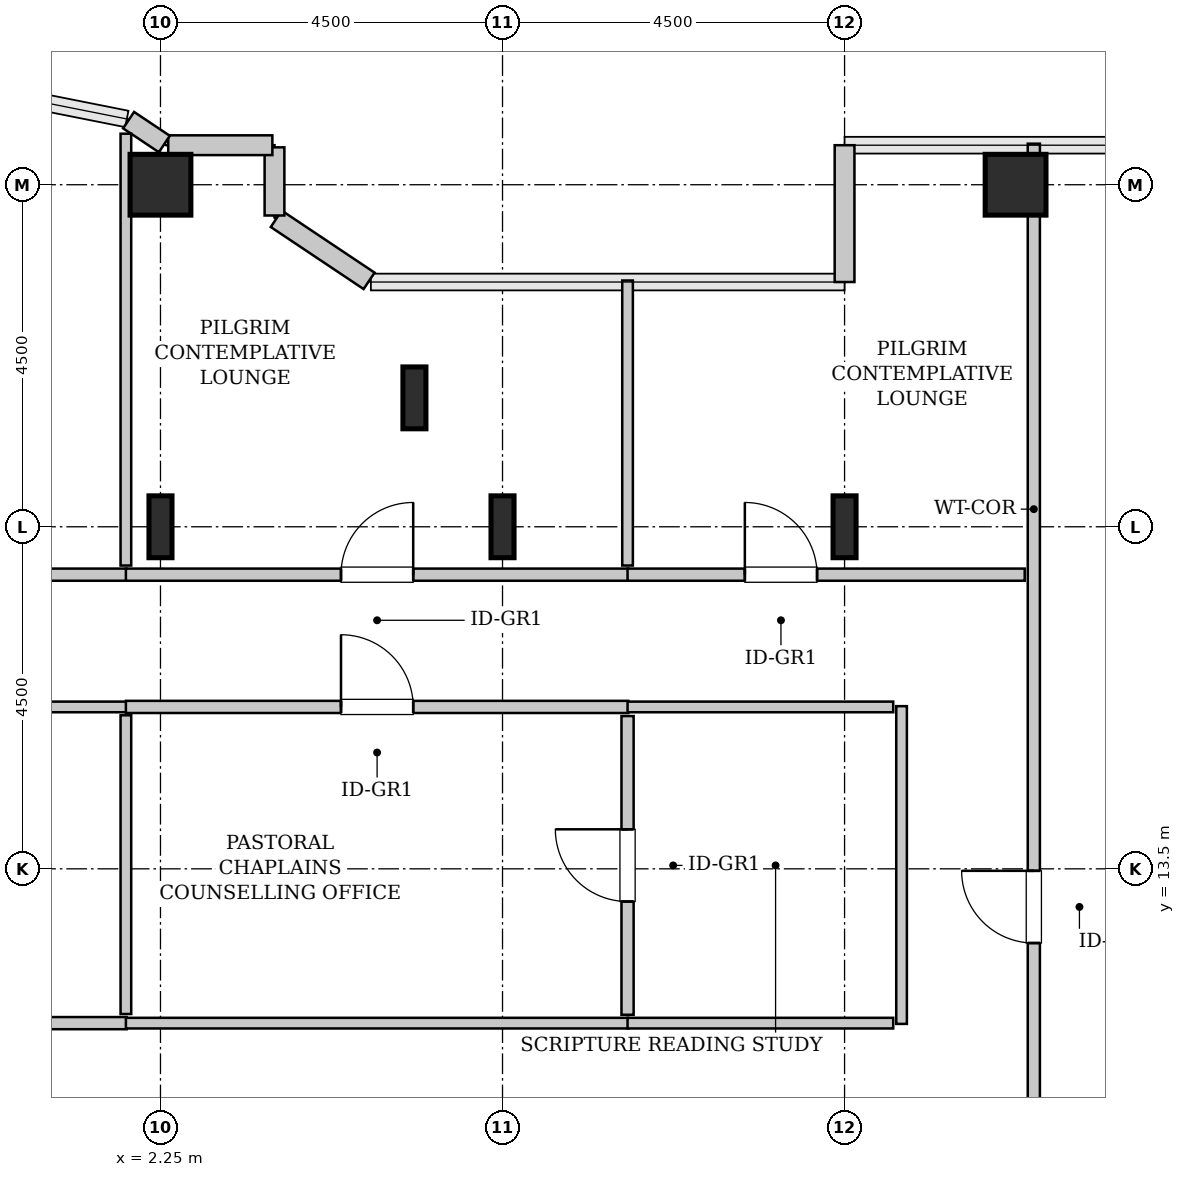
"""IFC4 building model, lengths in metres.
Left out: names, types, materials, properties, quantities, classifications, styles, units other than length and angle.
Written with IfcOpenShell. Run it as: python <this file> out.ifc"""

import sys

from ifc_helpers import new_model, si_unit, direction, frame, frame_2d, origin, origin_2d, place, context, subcontext, project, spatial, rectangle, hollow_rectangle, i_section, extrude, source, transform, mapped, element, fill, save


model = new_model("IFC4")
c1 = context("Model", 3, precision=1e-05, world=origin(), true_north=direction((0.0, 1.0)))
c2 = subcontext(c1, "Body", "Model", "MODEL_VIEW")
j1 = project(units=[si_unit("LENGTHUNIT", "METRE"), si_unit("PLANEANGLEUNIT", "RADIAN")], contexts=[c1])
p1 = place(None, origin())
s1 = spatial("IfcSite", under=j1, at=p1, CompositionType="ELEMENT")
p2 = place(p1, origin())
s2 = spatial("IfcBuilding", under=s1, at=p2, CompositionType="ELEMENT")
p3 = place(p2, frame((0.0, 0.0, 183.0)))
s3 = spatial("IfcBuildingStorey", under=s2, at=p3, CompositionType="ELEMENT", Elevation=183.0)
m1 = source(origin(), c2, "Body", "SweptSolid", [
    extrude(i_section(OverallWidth=0.303, OverallDepth=0.814, WebThickness=0.021, FlangeThickness=0.04, FilletRadius=0.03, at=origin_2d()), origin(), (0.0, 0.0, 1.0), 3.8),
])
p4 = place(p3, frame((2.25, 18.0, 0.0), z_axis=(0.0, 0.0, 1.0), x_axis=(1.0, 0.0, 0.0)))
e1 = element("IfcColumn", 1, at=p4, inside=s3, PredefinedType="COLUMN", context=c2, shape_type="MappedRepresentation", body=[
    mapped(m1, transform((0.0, 0.0, 0.0), x_axis=(1.0, 0.0, 0.0), y_axis=(0.0, 1.0, 0.0), z_axis=(0.0, 0.0, 1.0), scale=1.0)),
])
m2 = source(origin(), c2, "Body", "SweptSolid", [
    extrude(hollow_rectangle(XDim=0.8, YDim=0.8, WallThickness=0.04, InnerFilletRadius=0.04, OuterFilletRadius=0.08, at=origin_2d()), origin(), (0.0, 0.0, 1.0), 3.8),
])
p5 = place(p3, frame((2.25, 22.5, 0.0), z_axis=(0.0, 0.0, 1.0), x_axis=(1.0, 0.0, 0.0)))
e2 = element("IfcColumn", 2, at=p5, inside=s3, PredefinedType="COLUMN", context=c2, shape_type="MappedRepresentation", body=[
    mapped(m2, transform((0.0, 0.0, 0.0), x_axis=(1.0, 0.0, 0.0), y_axis=(0.0, 1.0, 0.0), z_axis=(0.0, 0.0, 1.0), scale=1.0)),
])
for number, where, z_axis, x_axis in (
    (3, (5.591, 19.696, 0.0), (0.0, 0.0, 1.0), (1.0, 0.0, 0.0)),
    (4, (6.75, 18.0, 0.0), (0.0, 0.0, 1.0), (1.0, 0.0, 0.0)),
    (5, (11.25, 18.0, 0.0), (0.0, 0.0, 1.0), (1.0, 0.0, 0.0)),
):
    element("IfcColumn", number, at=place(p3, frame(where, z_axis=z_axis, x_axis=x_axis)), inside=s3, PredefinedType="COLUMN", context=c2, shape_type="MappedRepresentation", body=[
        mapped(m1, transform((0.0, 0.0, 0.0), x_axis=(1.0, 0.0, 0.0), y_axis=(0.0, 1.0, 0.0), z_axis=(0.0, 0.0, 1.0), scale=1.0)),
    ])
p6 = place(p3, frame((13.5, 22.5, 0.0), z_axis=(0.0, 0.0, 1.0), x_axis=(1.0, 0.0, 0.0)))
e6 = element("IfcColumn", 6, at=p6, inside=s3, PredefinedType="COLUMN", context=c2, shape_type="MappedRepresentation", body=[
    mapped(m2, transform((0.0, 0.0, 0.0), x_axis=(1.0, 0.0, 0.0), y_axis=(0.0, 1.0, 0.0), z_axis=(0.0, 0.0, 1.0), scale=1.0)),
])
m3 = source(origin(), c2, "Body", "SweptSolid", [
    extrude(rectangle(XDim=1.8, YDim=0.26, at=frame_2d((0.9, 0.0))), origin(), (0.0, 0.0, 1.0), 3.55),
])
p7 = place(p3, frame((11.25, 23.02, 0.0), z_axis=(0.0, 0.0, 1.0), x_axis=(0.0, -1.0, 0.0)))
e7 = element("IfcWall", 7, at=p7, inside=s3, PredefinedType="SOLIDWALL", context=c2, shape_type="MappedRepresentation", body=[
    mapped(m3, transform((0.0, 0.0, 0.0), x_axis=(1.0, 0.0, 0.0), y_axis=(0.0, 1.0, 0.0), z_axis=(0.0, 0.0, 1.0), scale=1.0)),
])
m4 = source(origin(), c2, "Body", "SweptSolid", [
    extrude(rectangle(XDim=1.469, YDim=0.26, at=frame_2d((0.734, 0.0))), origin(), (0.0, 0.0, 1.0), 3.55),
])
p8 = place(p3, frame((4.995, 21.236, 0.0), z_axis=(0.0, 0.0, 1.0), x_axis=(-0.831461760506, 0.555581983884, 0.0)))
e8 = element("IfcWall", 8, at=p8, inside=s3, PredefinedType="SOLIDWALL", context=c2, shape_type="MappedRepresentation", body=[
    mapped(m4, transform((0.0, 0.0, 0.0), x_axis=(1.0, 0.0, 0.0), y_axis=(0.0, 1.0, 0.0), z_axis=(0.0, 0.0, 1.0), scale=1.0)),
])
m5 = source(origin(), c2, "Body", "SweptSolid", [
    extrude(rectangle(XDim=0.897, YDim=0.26, at=frame_2d((0.448, 0.0))), origin(), (0.0, 0.0, 1.0), 3.55),
])
p9 = place(p3, frame((3.75, 22.095, 0.0), z_axis=(0.0, 0.0, 1.0), x_axis=(0.0, 1.0, 0.0)))
e9 = element("IfcWall", 9, at=p9, inside=s3, PredefinedType="SOLIDWALL", context=c2, shape_type="MappedRepresentation", body=[
    mapped(m5, transform((0.0, 0.0, 0.0), x_axis=(1.0, 0.0, 0.0), y_axis=(0.0, 1.0, 0.0), z_axis=(0.0, 0.0, 1.0), scale=1.0)),
])
m6 = source(origin(), c2, "Body", "SweptSolid", [
    extrude(rectangle(XDim=1.37, YDim=0.26, at=frame_2d((0.685, 0.0))), origin(), (0.0, 0.0, 1.0), 3.55),
])
p10 = place(p3, frame((3.722, 23.02, 0.0), z_axis=(0.0, 0.0, 1.0), x_axis=(-1.0, 0.0, 0.0)))
e10 = element("IfcWall", 10, at=p10, inside=s3, PredefinedType="SOLIDWALL", context=c2, shape_type="MappedRepresentation", body=[
    mapped(m6, transform((0.0, 0.0, 0.0), x_axis=(1.0, 0.0, 0.0), y_axis=(0.0, 1.0, 0.0), z_axis=(0.0, 0.0, 1.0), scale=1.0)),
])
m7 = source(origin(), c2, "Body", "SweptSolid", [
    extrude(rectangle(XDim=0.565, YDim=0.26, at=frame_2d((0.283, 0.0))), origin(), (0.0, 0.0, 1.0), 3.55),
])
p11 = place(p3, frame((2.301, 23.036, 0.0), z_axis=(0.0, 0.0, 1.0), x_axis=(-0.831651492666, 0.555297933317, 0.0)))
e11 = element("IfcWall", 11, at=p11, inside=s3, PredefinedType="SOLIDWALL", context=c2, shape_type="MappedRepresentation", body=[
    mapped(m7, transform((0.0, 0.0, 0.0), x_axis=(1.0, 0.0, 0.0), y_axis=(0.0, 1.0, 0.0), z_axis=(0.0, 0.0, 1.0), scale=1.0)),
])
m8 = source(origin(), c2, "Body", "SweptSolid", [
    extrude(rectangle(XDim=14.453, YDim=0.16, at=frame_2d((7.226, 0.0))), origin(), (0.0, 0.0, 1.0), 3.535),
])
p12 = place(p3, frame((13.74, 8.587, 0.0), z_axis=(0.0, 0.0, 1.0), x_axis=(0.0, 1.0, 0.0)))
e12 = element("IfcWall", 12, at=p12, inside=s3, PredefinedType="PARTITIONING", context=c2, shape_type="MappedRepresentation", body=[
    mapped(m8, transform((0.0, 0.0, 0.0), x_axis=(1.0, 0.0, 0.0), y_axis=(0.0, 1.0, 0.0), z_axis=(0.0, 0.0, 1.0), scale=1.0)),
])
p13 = place(p12, frame((3.936, 0.0, 0.0)))
e13 = element("IfcOpeningElement", 13, at=p13, cuts=e12, PredefinedType="OPENING", context=c2, shape_type="SweptSolid", body=[
    extrude(rectangle(XDim=0.95, YDim=2.1, at=frame_2d((0.475, 1.05))), frame((0.0, 0.09, 0.0), z_axis=(0.0, -1.0, 0.0), x_axis=(1.0, 0.0, 0.0)), (0.0, 0.0, 1.0), 0.18),
])
m9 = source(origin(), c2, "Body", "SweptSolid", [
    extrude(rectangle(XDim=13.815, YDim=0.16, at=frame_2d((6.907, 0.0))), origin(), (0.0, 0.0, 1.0), 3.535),
])
p14 = place(p3, frame((-12.01, 11.47, 0.0), z_axis=(0.0, 0.0, 1.0), x_axis=(1.0, 0.0, 0.0)))
e14 = element("IfcWall", 14, at=p14, inside=s3, PredefinedType="PARTITIONING", context=c2, shape_type="MappedRepresentation", body=[
    mapped(m9, transform((0.0, 0.0, 0.0), x_axis=(1.0, 0.0, 0.0), y_axis=(0.0, 1.0, 0.0), z_axis=(0.0, 0.0, 1.0), scale=1.0)),
])
p15 = place(p14, frame((6.433, 0.0, 0.0)))
e15 = element("IfcOpeningElement", 15, at=p15, cuts=e14, PredefinedType="OPENING", context=c2, shape_type="SweptSolid", body=[
    extrude(rectangle(XDim=0.95, YDim=2.1, at=frame_2d((0.475, 1.05))), frame((0.0, 0.09, 0.0), z_axis=(0.0, -1.0, 0.0), x_axis=(1.0, 0.0, 0.0)), (0.0, 0.0, 1.0), 0.18),
])
m10 = source(origin(), c2, "Body", "SweptSolid", [
    extrude(rectangle(XDim=13.815, YDim=0.14, at=frame_2d((6.907, 0.0))), origin(), (0.0, 0.0, 1.0), 3.535),
])
p16 = place(p3, frame((-12.01, 15.63, 0.0), z_axis=(0.0, 0.0, 1.0), x_axis=(1.0, 0.0, 0.0)))
e16 = element("IfcWall", 16, at=p16, inside=s3, PredefinedType="PARTITIONING", context=c2, shape_type="MappedRepresentation", body=[
    mapped(m10, transform((0.0, 0.0, 0.0), x_axis=(1.0, 0.0, 0.0), y_axis=(0.0, 1.0, 0.0), z_axis=(0.0, 0.0, 1.0), scale=1.0)),
])
m11 = source(origin(), c2, "Body", "SweptSolid", [
    extrude(rectangle(XDim=3.93, YDim=0.14, at=frame_2d((1.965, 0.0))), origin(), (0.0, 0.0, 1.0), 3.535),
])
p17 = place(p3, frame((1.795, 11.59, 0.0), z_axis=(0.0, 0.0, 1.0), x_axis=(0.0, 1.0, 0.0)))
e17 = element("IfcWall", 17, at=p17, inside=s3, PredefinedType="PARTITIONING", context=c2, shape_type="MappedRepresentation", body=[
    mapped(m11, transform((0.0, 0.0, 0.0), x_axis=(1.0, 0.0, 0.0), y_axis=(0.0, 1.0, 0.0), z_axis=(0.0, 0.0, 1.0), scale=1.0)),
])
m12 = source(origin(), c2, "Body", "SweptSolid", [
    extrude(rectangle(XDim=9.245, YDim=0.16, at=frame_2d((4.623, 0.0))), origin(), (0.0, 0.0, 1.0), 3.535),
])
p18 = place(p3, frame((-7.44, 17.37, 0.0), z_axis=(0.0, 0.0, 1.0), x_axis=(1.0, 0.0, 0.0)))
e18 = element("IfcWall", 18, at=p18, inside=s3, PredefinedType="PARTITIONING", context=c2, shape_type="MappedRepresentation", body=[
    mapped(m12, transform((0.0, 0.0, 0.0), x_axis=(1.0, 0.0, 0.0), y_axis=(0.0, 1.0, 0.0), z_axis=(0.0, 0.0, 1.0), scale=1.0)),
])
p19 = place(p18, frame((3.529, 0.0, 0.0)))
e19 = element("IfcOpeningElement", 19, at=p19, cuts=e18, PredefinedType="OPENING", context=c2, shape_type="SweptSolid", body=[
    extrude(rectangle(XDim=0.95, YDim=2.1, at=frame_2d((0.475, 1.05))), frame((0.0, 0.09, 0.0), z_axis=(0.0, -1.0, 0.0), x_axis=(1.0, 0.0, 0.0)), (0.0, 0.0, 1.0), 0.18),
])
m13 = source(origin(), c2, "Body", "SweptSolid", [
    extrude(rectangle(XDim=5.681, YDim=0.14, at=frame_2d((2.841, 0.0))), origin(), (0.0, 0.0, 1.0), 2.875),
])
p20 = place(p3, frame((1.795, 17.49, 0.0), z_axis=(0.0, 0.0, 1.0), x_axis=(0.0, 1.0, 0.0)))
e20 = element("IfcWall", 20, at=p20, inside=s3, PredefinedType="PARTITIONING", context=c2, shape_type="MappedRepresentation", body=[
    mapped(m13, transform((0.0, 0.0, 0.0), x_axis=(1.0, 0.0, 0.0), y_axis=(0.0, 1.0, 0.0), z_axis=(0.0, 0.0, 1.0), scale=1.0)),
])
m14 = source(origin(), c2, "Body", "SweptSolid", [
    extrude(rectangle(XDim=6.61, YDim=0.16, at=frame_2d((3.305, 0.0))), origin(), (0.0, 0.0, 1.0), 3.535),
])
p21 = place(p3, frame((1.795, 17.37, 0.0), z_axis=(0.0, 0.0, 1.0), x_axis=(1.0, 0.0, 0.0)))
e21 = element("IfcWall", 21, at=p21, inside=s3, PredefinedType="PARTITIONING", context=c2, shape_type="MappedRepresentation", body=[
    mapped(m14, transform((0.0, 0.0, 0.0), x_axis=(1.0, 0.0, 0.0), y_axis=(0.0, 1.0, 0.0), z_axis=(0.0, 0.0, 1.0), scale=1.0)),
])
p22 = place(p21, frame((2.83, 0.0, 0.0)))
e22 = element("IfcOpeningElement", 22, at=p22, cuts=e21, PredefinedType="OPENING", context=c2, shape_type="SweptSolid", body=[
    extrude(rectangle(XDim=0.95, YDim=2.1, at=frame_2d((0.475, 1.05))), frame((0.0, 0.09, 0.0), z_axis=(0.0, -1.0, 0.0), x_axis=(1.0, 0.0, 0.0)), (0.0, 0.0, 1.0), 0.18),
])
m15 = source(origin(), c2, "Body", "SweptSolid", [
    extrude(rectangle(XDim=3.75, YDim=0.14, at=frame_2d((1.875, 0.0))), origin(), (0.0, 0.0, 1.0), 3.535),
])
p23 = place(p3, frame((8.395, 17.49, 0.0), z_axis=(0.0, 0.0, 1.0), x_axis=(0.0, 1.0, 0.0)))
e23 = element("IfcWall", 23, at=p23, inside=s3, PredefinedType="PARTITIONING", context=c2, shape_type="MappedRepresentation", body=[
    mapped(m15, transform((0.0, 0.0, 0.0), x_axis=(1.0, 0.0, 0.0), y_axis=(0.0, 1.0, 0.0), z_axis=(0.0, 0.0, 1.0), scale=1.0)),
])
p24 = place(p3, frame((1.795, 15.63, 0.0), z_axis=(0.0, 0.0, 1.0), x_axis=(1.0, 0.0, 0.0)))
e24 = element("IfcWall", 24, at=p24, inside=s3, PredefinedType="PARTITIONING", context=c2, shape_type="MappedRepresentation", body=[
    mapped(m14, transform((0.0, 0.0, 0.0), x_axis=(1.0, 0.0, 0.0), y_axis=(0.0, 1.0, 0.0), z_axis=(0.0, 0.0, 1.0), scale=1.0)),
])
p25 = place(p24, frame((2.83, 0.0, 0.0)))
e25 = element("IfcOpeningElement", 25, at=p25, cuts=e24, PredefinedType="OPENING", context=c2, shape_type="SweptSolid", body=[
    extrude(rectangle(XDim=0.95, YDim=2.1, at=frame_2d((0.475, 1.05))), frame((0.0, 0.09, 0.0), z_axis=(0.0, -1.0, 0.0), x_axis=(1.0, 0.0, 0.0)), (0.0, 0.0, 1.0), 0.18),
])
m16 = source(origin(), c2, "Body", "SweptSolid", [
    extrude(rectangle(XDim=6.61, YDim=0.14, at=frame_2d((3.305, 0.0))), origin(), (0.0, 0.0, 1.0), 3.535),
])
p26 = place(p3, frame((1.795, 11.47, 0.0), z_axis=(0.0, 0.0, 1.0), x_axis=(1.0, 0.0, 0.0)))
e26 = element("IfcWall", 26, at=p26, inside=s3, PredefinedType="PARTITIONING", context=c2, shape_type="MappedRepresentation", body=[
    mapped(m16, transform((0.0, 0.0, 0.0), x_axis=(1.0, 0.0, 0.0), y_axis=(0.0, 1.0, 0.0), z_axis=(0.0, 0.0, 1.0), scale=1.0)),
])
m17 = source(origin(), c2, "Body", "SweptSolid", [
    extrude(rectangle(XDim=3.93, YDim=0.16, at=frame_2d((1.965, 0.0))), origin(), (0.0, 0.0, 1.0), 3.535),
])
p27 = place(p3, frame((8.395, 11.58, 0.0), z_axis=(0.0, 0.0, 1.0), x_axis=(0.0, 1.0, 0.0)))
e27 = element("IfcWall", 27, at=p27, inside=s3, PredefinedType="PARTITIONING", context=c2, shape_type="MappedRepresentation", body=[
    mapped(m17, transform((0.0, 0.0, 0.0), x_axis=(1.0, 0.0, 0.0), y_axis=(0.0, 1.0, 0.0), z_axis=(0.0, 0.0, 1.0), scale=1.0)),
])
p28 = place(p27, frame((1.49, 0.0, 0.0)))
e28 = element("IfcOpeningElement", 28, at=p28, cuts=e27, PredefinedType="OPENING", context=c2, shape_type="SweptSolid", body=[
    extrude(rectangle(XDim=0.95, YDim=2.1, at=frame_2d((0.475, 1.05))), frame((0.0, 0.09, 0.0), z_axis=(0.0, -1.0, 0.0), x_axis=(1.0, 0.0, 0.0)), (0.0, 0.0, 1.0), 0.18),
])
m18 = source(origin(), c2, "Body", "SweptSolid", [
    extrude(rectangle(XDim=5.225, YDim=0.16, at=frame_2d((2.613, 0.0))), origin(), (0.0, 0.0, 1.0), 3.535),
])
p29 = place(p3, frame((8.395, 17.37, 0.0), z_axis=(0.0, 0.0, 1.0), x_axis=(1.0, 0.0, 0.0)))
e29 = element("IfcWall", 29, at=p29, inside=s3, PredefinedType="PARTITIONING", context=c2, shape_type="MappedRepresentation", body=[
    mapped(m18, transform((0.0, 0.0, 0.0), x_axis=(1.0, 0.0, 0.0), y_axis=(0.0, 1.0, 0.0), z_axis=(0.0, 0.0, 1.0), scale=1.0)),
])
p30 = place(p29, frame((1.543, 0.0, 0.0)))
e30 = element("IfcOpeningElement", 30, at=p30, cuts=e29, PredefinedType="OPENING", context=c2, shape_type="SweptSolid", body=[
    extrude(rectangle(XDim=0.95, YDim=2.1, at=frame_2d((0.475, 1.05))), frame((0.0, 0.09, 0.0), z_axis=(0.0, -1.0, 0.0), x_axis=(1.0, 0.0, 0.0)), (0.0, 0.0, 1.0), 0.18),
])
m19 = source(origin(), c2, "Body", "SweptSolid", [
    extrude(rectangle(XDim=4.18, YDim=0.14, at=frame_2d((2.09, 0.0))), origin(), (0.0, 0.0, 1.0), 3.535),
])
p31 = place(p3, frame((12.0, 11.46, 0.0), z_axis=(0.0, 0.0, 1.0), x_axis=(0.0, 1.0, 0.0)))
e31 = element("IfcWall", 31, at=p31, inside=s3, PredefinedType="PARTITIONING", context=c2, shape_type="MappedRepresentation", body=[
    mapped(m19, transform((0.0, 0.0, 0.0), x_axis=(1.0, 0.0, 0.0), y_axis=(0.0, 1.0, 0.0), z_axis=(0.0, 0.0, 1.0), scale=1.0)),
])
m20 = source(origin(), c2, "Body", "SweptSolid", [
    extrude(rectangle(XDim=3.495, YDim=0.14, at=frame_2d((1.748, 0.0))), origin(), (0.0, 0.0, 1.0), 3.535),
])
for number, where, z_axis, x_axis in (
    (32, (8.395, 15.63, 0.0), (0.0, 0.0, 1.0), (1.0, 0.0, 0.0)),
    (33, (8.395, 11.47, 0.0), (0.0, 0.0, 1.0), (1.0, 0.0, 0.0)),
):
    element("IfcWall", number, at=place(p3, frame(where, z_axis=z_axis, x_axis=x_axis)), inside=s3, PredefinedType="PARTITIONING", context=c2, shape_type="MappedRepresentation", body=[
        mapped(m20, transform((0.0, 0.0, 0.0), x_axis=(1.0, 0.0, 0.0), y_axis=(0.0, 1.0, 0.0), z_axis=(0.0, 0.0, 1.0), scale=1.0)),
    ])
m21 = source(origin(), c2, "Body", "SweptSolid", [
    extrude(rectangle(XDim=0.95, YDim=2.1, at=frame_2d((0.475, 1.05))), frame((0.0, 0.025, 0.0), z_axis=(0.0, -1.0, 0.0), x_axis=(1.0, 0.0, 0.0)), (0.0, 0.0, 1.0), 0.05),
])
p32 = place(p13, origin())
e34 = element("IfcDoor", 34, at=p32, inside=s3, OperationType="SINGLE_SWING_RIGHT", PredefinedType="DOOR", context=c2, shape_type="MappedRepresentation", body=[
    mapped(m21, transform((0.0, 0.0, 0.0), x_axis=(1.0, 0.0, 0.0), y_axis=(0.0, 1.0, 0.0), z_axis=(0.0, 0.0, 1.0), scale=1.0)),
])
fill(e13, e34)
p33 = place(p22, origin())
e35 = element("IfcDoor", 35, at=p33, inside=s3, OperationType="SINGLE_SWING_RIGHT", PredefinedType="DOOR", context=c2, shape_type="MappedRepresentation", body=[
    mapped(m21, transform((0.0, 0.0, 0.0), x_axis=(1.0, 0.0, 0.0), y_axis=(0.0, 1.0, 0.0), z_axis=(0.0, 0.0, 1.0), scale=1.0)),
])
fill(e22, e35)
p34 = place(p25, origin())
e36 = element("IfcDoor", 36, at=p34, inside=s3, OperationType="SINGLE_SWING_LEFT", PredefinedType="DOOR", context=c2, shape_type="MappedRepresentation", body=[
    mapped(m21, transform((0.0, 0.0, 0.0), x_axis=(1.0, 0.0, 0.0), y_axis=(0.0, 1.0, 0.0), z_axis=(0.0, 0.0, 1.0), scale=1.0)),
])
fill(e25, e36)
p35 = place(p28, origin())
e37 = element("IfcDoor", 37, at=p35, inside=s3, OperationType="SINGLE_SWING_RIGHT", PredefinedType="DOOR", context=c2, shape_type="MappedRepresentation", body=[
    mapped(m21, transform((0.0, 0.0, 0.0), x_axis=(1.0, 0.0, 0.0), y_axis=(0.0, 1.0, 0.0), z_axis=(0.0, 0.0, 1.0), scale=1.0)),
])
fill(e28, e37)
p36 = place(p30, origin())
e38 = element("IfcDoor", 38, at=p36, inside=s3, OperationType="SINGLE_SWING_LEFT", PredefinedType="DOOR", context=c2, shape_type="MappedRepresentation", body=[
    mapped(m21, transform((0.0, 0.0, 0.0), x_axis=(1.0, 0.0, 0.0), y_axis=(0.0, 1.0, 0.0), z_axis=(0.0, 0.0, 1.0), scale=1.0)),
])
fill(e30, e38)
save(model, sys.argv[1])
